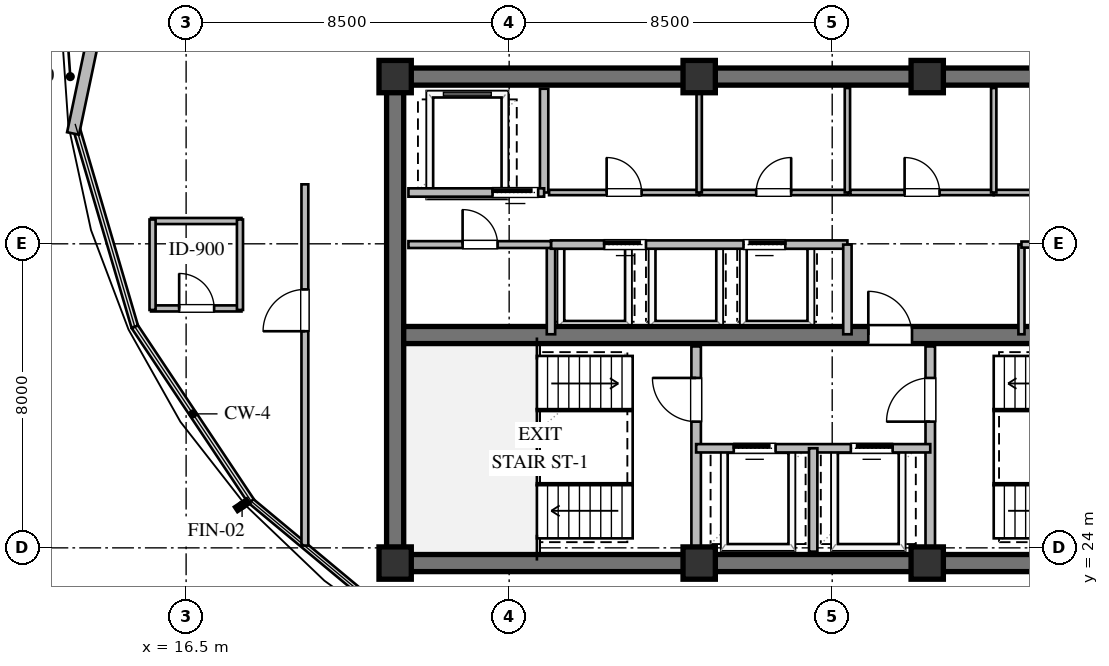
"""IFC4 building model, lengths in metres.
Left out: names, types, materials, properties, quantities, classifications, styles, units other than length and angle.
Written with IfcOpenShell. Run it as: python <this file> out.ifc"""

import sys

from ifc_helpers import new_model, si_unit, direction, frame, frame_2d, origin, origin_2d, place, context, subcontext, project, spatial, rectangle, extrude, element, fill, save


model = new_model("IFC4")
c1 = context("Model", 3, precision=1e-05, world=origin(), true_north=direction((0.0, 1.0)))
c2 = subcontext(c1, "Body", "Model", "MODEL_VIEW")
j1 = project(units=[si_unit("LENGTHUNIT", "METRE"), si_unit("PLANEANGLEUNIT", "RADIAN")], contexts=[c1])
p1 = place(None, origin())
s1 = spatial("IfcSite", under=j1, at=p1, CompositionType="ELEMENT")
p2 = place(p1, origin())
s2 = spatial("IfcBuilding", under=s1, at=p2, CompositionType="ELEMENT")
p3 = place(p2, frame((0.0, 0.0, 249.6)))
s3 = spatial("IfcBuildingStorey", under=s2, at=p3, CompositionType="ELEMENT", Elevation=249.6)
for number, where, z_axis, x_axis in (
    (1, (21.775, 23.6, 0.0), (0.0, 0.0, 1.0), (1.0, 0.0, 0.0)),
    (2, (21.775, 36.4, 0.0), (0.0, 0.0, 1.0), (1.0, 0.0, 0.0)),
):
    element("IfcWall", number, at=place(p3, frame(where, z_axis=z_axis, x_axis=x_axis)), inside=s3, PredefinedType="SHEAR", context=c2, shape_type="SweptSolid", body=[
        extrude(rectangle(XDim=22.45, YDim=0.45, at=frame_2d((11.225, 0.0))), origin(), (0.0, 0.0, 1.0), 3.28),
    ])
p4 = place(p3, frame((22.0, 23.825, 0.0), z_axis=(0.0, 0.0, 1.0), x_axis=(0.0, 1.0, 0.0)))
e3 = element("IfcWall", 3, at=p4, inside=s3, PredefinedType="SHEAR", context=c2, shape_type="SweptSolid", body=[
    extrude(rectangle(XDim=12.35, YDim=0.45, at=frame_2d((6.175, 0.0))), origin(), (0.0, 0.0, 1.0), 3.28),
])
p5 = place(p3, frame((22.225, 29.6, 0.0), z_axis=(0.0, 0.0, 1.0), x_axis=(1.0, 0.0, 0.0)))
e4 = element("IfcWall", 4, at=p5, inside=s3, PredefinedType="SHEAR", context=c2, shape_type="SweptSolid", body=[
    extrude(rectangle(XDim=21.55, YDim=0.45, at=frame_2d((10.775, 0.0))), origin(), (0.0, 0.0, 1.0), 3.28),
])
p6 = place(p5, frame((12.225, 0.0, 0.0)))
e5 = element("IfcOpeningElement", 5, at=p6, cuts=e4, PredefinedType="OPENING", context=c2, shape_type="SweptSolid", body=[
    extrude(rectangle(XDim=1.15, YDim=2.1, at=frame_2d((0.575, 1.05))), frame((0.0, 0.235, 0.0), z_axis=(0.0, -1.0, 0.0), x_axis=(1.0, 0.0, 0.0)), (0.0, 0.0, 1.0), 0.47),
])
for number, where, z_axis, x_axis in (
    (6, (22.0, 23.6, 0.0), (0.0, 0.0, 1.0), (1.0, 0.0, 0.0)),
    (7, (30.0, 23.6, 0.0), (0.0, 0.0, 1.0), (1.0, 0.0, 0.0)),
    (8, (36.0, 23.6, 0.0), (0.0, 0.0, 1.0), (1.0, 0.0, 0.0)),
    (9, (36.0, 36.4, 0.0), (0.0, 0.0, 1.0), (1.0, 0.0, 0.0)),
    (10, (30.0, 36.4, 0.0), (0.0, 0.0, 1.0), (1.0, 0.0, 0.0)),
    (11, (22.0, 36.4, 0.0), (0.0, 0.0, 1.0), (1.0, 0.0, 0.0)),
):
    element("IfcColumn", number, at=place(p3, frame(where, z_axis=z_axis, x_axis=x_axis)), inside=s3, PredefinedType="COLUMN", context=c2, shape_type="SweptSolid", body=[
        extrude(rectangle(XDim=0.85, YDim=0.85, at=origin_2d()), origin(), (0.0, 0.0, 1.0), 3.6),
    ])
p7 = place(p3, frame((13.525, 34.903, 0.0), z_axis=(0.0, 0.0, 1.0), x_axis=(0.206301080321, 0.978488561128, 0.0)))
e12 = element("IfcWall", 12, at=p7, inside=s3, PredefinedType="STANDARD", context=c2, shape_type="SweptSolid", body=[
    extrude(rectangle(XDim=14.819, YDim=0.32, at=frame_2d((7.409, 0.0))), origin(), (0.0, 0.0, 1.0), 2.726),
])
p8 = place(p3, frame((29.92, 23.9, 0.0), z_axis=(0.0, 0.0, 1.0), x_axis=(0.0, 1.0, 0.0)))
e13 = element("IfcWall", 13, at=p8, inside=s3, PredefinedType="SOLIDWALL", context=c2, shape_type="SweptSolid", body=[
    extrude(rectangle(XDim=5.4, YDim=0.25, at=frame_2d((2.7, 0.0))), origin(), (0.0, 0.0, 1.0), 3.28),
])
p9 = place(p8, frame((3.421, 0.0, 0.0)))
e14 = element("IfcOpeningElement", 14, at=p9, cuts=e13, PredefinedType="OPENING", context=c2, shape_type="SweptSolid", body=[
    extrude(rectangle(XDim=1.15, YDim=2.1, at=frame_2d((0.575, 1.05))), frame((0.0, 0.135, 0.0), z_axis=(0.0, -1.0, 0.0), x_axis=(1.0, 0.0, 0.0)), (0.0, 0.0, 1.0), 0.27),
])
p10 = place(p3, frame((36.08, 23.9, 0.0), z_axis=(0.0, 0.0, 1.0), x_axis=(0.0, 1.0, 0.0)))
e15 = element("IfcWall", 15, at=p10, inside=s3, PredefinedType="SOLIDWALL", context=c2, shape_type="SweptSolid", body=[
    extrude(rectangle(XDim=5.4, YDim=0.25, at=frame_2d((2.7, 0.0))), origin(), (0.0, 0.0, 1.0), 3.28),
])
p11 = place(p10, frame((3.421, 0.0, 0.0)))
e16 = element("IfcOpeningElement", 16, at=p11, cuts=e15, PredefinedType="OPENING", context=c2, shape_type="SweptSolid", body=[
    extrude(rectangle(XDim=1.15, YDim=2.1, at=frame_2d((0.575, 1.05))), frame((0.0, 0.135, 0.0), z_axis=(0.0, -1.0, 0.0), x_axis=(1.0, 0.0, 0.0)), (0.0, 0.0, 1.0), 0.27),
])
p12 = place(p3, frame((29.92, 26.62, 0.0), z_axis=(0.0, 0.0, 1.0), x_axis=(1.0, 0.0, 0.0)))
e17 = element("IfcWall", 17, at=p12, inside=s3, PredefinedType="SOLIDWALL", context=c2, shape_type="SweptSolid", body=[
    extrude(rectangle(XDim=6.16, YDim=0.22, at=frame_2d((3.08, 0.0))), origin(), (0.0, 0.0, 1.0), 3.28),
])
p13 = place(p12, frame((0.99, 0.0, 0.0)))
e18 = element("IfcOpeningElement", 18, at=p13, cuts=e17, PredefinedType="OPENING", context=c2, shape_type="SweptSolid", body=[
    extrude(rectangle(XDim=1.1, YDim=2.1, at=frame_2d((0.55, 1.05))), frame((0.0, 0.12, 0.0), z_axis=(0.0, -1.0, 0.0), x_axis=(1.0, 0.0, 0.0)), (0.0, 0.0, 1.0), 0.24),
])
p14 = place(p12, frame((4.07, 0.0, 0.0)))
e19 = element("IfcOpeningElement", 19, at=p14, cuts=e17, PredefinedType="OPENING", context=c2, shape_type="SweptSolid", body=[
    extrude(rectangle(XDim=1.1, YDim=2.1, at=frame_2d((0.55, 1.05))), frame((0.0, 0.12, 0.0), z_axis=(0.0, -1.0, 0.0), x_axis=(1.0, 0.0, 0.0)), (0.0, 0.0, 1.0), 0.24),
])
p15 = place(p3, frame((33.0, 23.9, 0.0), z_axis=(0.0, 0.0, 1.0), x_axis=(0.0, 1.0, 0.0)))
e20 = element("IfcWall", 20, at=p15, inside=s3, PredefinedType="SOLIDWALL", context=c2, shape_type="SweptSolid", body=[
    extrude(rectangle(XDim=2.72, YDim=0.22, at=frame_2d((1.36, 0.0))), origin(), (0.0, 0.0, 1.0), 3.28),
])
p16 = place(p3, frame((25.92, 33.35, 0.0), z_axis=(0.0, 0.0, 1.0), x_axis=(0.0, 1.0, 0.0)))
e21 = element("IfcWall", 21, at=p16, inside=s3, PredefinedType="SOLIDWALL", context=c2, shape_type="SweptSolid", body=[
    extrude(rectangle(XDim=2.73, YDim=0.22, at=frame_2d((1.365, 0.0))), origin(), (0.0, 0.0, 1.0), 3.28),
])
p17 = place(p3, frame((22.35, 33.35, 0.0), z_axis=(0.0, 0.0, 1.0), x_axis=(1.0, 0.0, 0.0)))
e22 = element("IfcWall", 22, at=p17, inside=s3, PredefinedType="SOLIDWALL", context=c2, shape_type="SweptSolid", body=[
    extrude(rectangle(XDim=3.57, YDim=0.22, at=frame_2d((1.785, 0.0))), origin(), (0.0, 0.0, 1.0), 3.28),
])
p18 = place(p17, frame((2.213, 0.0, 0.0)))
e23 = element("IfcOpeningElement", 23, at=p18, cuts=e22, PredefinedType="OPENING", context=c2, shape_type="SweptSolid", body=[
    extrude(rectangle(XDim=1.2, YDim=2.1, at=frame_2d((0.6, 1.05))), frame((0.0, 0.12, 0.0), z_axis=(0.0, -1.0, 0.0), x_axis=(1.0, 0.0, 0.0)), (0.0, 0.0, 1.0), 0.24),
])
p19 = place(p3, frame((26.1, 29.62, 0.0), z_axis=(0.0, 0.0, 1.0), x_axis=(0.0, 1.0, 0.0)))
e24 = element("IfcWall", 24, at=p19, inside=s3, PredefinedType="SOLIDWALL", context=c2, shape_type="SweptSolid", body=[
    extrude(rectangle(XDim=2.36, YDim=0.22, at=frame_2d((1.18, 0.0))), origin(), (0.0, 0.0, 1.0), 3.28),
])
p20 = place(p3, frame((26.1, 31.98, 0.0), z_axis=(0.0, 0.0, 1.0), x_axis=(1.0, 0.0, 0.0)))
e25 = element("IfcWall", 25, at=p20, inside=s3, PredefinedType="SOLIDWALL", context=c2, shape_type="SweptSolid", body=[
    extrude(rectangle(XDim=7.8, YDim=0.22, at=frame_2d((3.9, 0.0))), origin(), (0.0, 0.0, 1.0), 3.28),
])
p21 = place(p20, frame((1.4, 0.0, 0.0)))
e26 = element("IfcOpeningElement", 26, at=p21, cuts=e25, PredefinedType="OPENING", context=c2, shape_type="SweptSolid", body=[
    extrude(rectangle(XDim=1.1, YDim=2.1, at=frame_2d((0.55, 1.05))), frame((0.0, 0.12, 0.0), z_axis=(0.0, -1.0, 0.0), x_axis=(1.0, 0.0, 0.0)), (0.0, 0.0, 1.0), 0.24),
])
p22 = place(p20, frame((5.066, 0.0, 0.0)))
e27 = element("IfcOpeningElement", 27, at=p22, cuts=e25, PredefinedType="OPENING", context=c2, shape_type="SweptSolid", body=[
    extrude(rectangle(XDim=1.1, YDim=2.1, at=frame_2d((0.55, 1.05))), frame((0.0, 0.12, 0.0), z_axis=(0.0, -1.0, 0.0), x_axis=(1.0, 0.0, 0.0)), (0.0, 0.0, 1.0), 0.24),
])
p23 = place(p3, frame((33.9, 29.62, 0.0), z_axis=(0.0, 0.0, 1.0), x_axis=(0.0, 1.0, 0.0)))
e28 = element("IfcWall", 28, at=p23, inside=s3, PredefinedType="SOLIDWALL", context=c2, shape_type="SweptSolid", body=[
    extrude(rectangle(XDim=2.36, YDim=0.22, at=frame_2d((1.18, 0.0))), origin(), (0.0, 0.0, 1.0), 3.28),
])
p24 = place(p3, frame((26.05, 33.35, 0.0), z_axis=(0.0, 0.0, 1.0), x_axis=(1.0, 0.0, 0.0)))
e29 = element("IfcWall", 29, at=p24, inside=s3, PredefinedType="PARTITIONING", context=c2, shape_type="SweptSolid", body=[
    extrude(rectangle(XDim=3.95, YDim=0.14, at=frame_2d((1.975, 0.0))), origin(), (0.0, 0.0, 1.0), 3.28),
])
p25 = place(p24, frame((1.515, 0.0, 0.0)))
e30 = element("IfcOpeningElement", 30, at=p25, cuts=e29, PredefinedType="OPENING", context=c2, shape_type="SweptSolid", body=[
    extrude(rectangle(XDim=0.92, YDim=2.1, at=frame_2d((0.46, 1.05))), frame((0.0, 0.08, 0.0), z_axis=(0.0, -1.0, 0.0), x_axis=(1.0, 0.0, 0.0)), (0.0, 0.0, 1.0), 0.16),
])
p26 = place(p3, frame((30.0, 33.35, 0.0), z_axis=(0.0, 0.0, 1.0), x_axis=(1.0, 0.0, 0.0)))
e31 = element("IfcWall", 31, at=p26, inside=s3, PredefinedType="PARTITIONING", context=c2, shape_type="SweptSolid", body=[
    extrude(rectangle(XDim=3.92, YDim=0.14, at=frame_2d((1.96, 0.0))), origin(), (0.0, 0.0, 1.0), 3.28),
])
p27 = place(p26, frame((1.5, 0.0, 0.0)))
e32 = element("IfcOpeningElement", 32, at=p27, cuts=e31, PredefinedType="OPENING", context=c2, shape_type="SweptSolid", body=[
    extrude(rectangle(XDim=0.92, YDim=2.1, at=frame_2d((0.46, 1.05))), frame((0.0, 0.08, 0.0), z_axis=(0.0, -1.0, 0.0), x_axis=(1.0, 0.0, 0.0)), (0.0, 0.0, 1.0), 0.16),
])
for number, where, z_axis, x_axis in (
    (33, (30.0, 33.35, 0.0), (0.0, 0.0, 1.0), (0.0, 1.0, 0.0)),
    (34, (33.9, 33.35, 0.0), (0.0, 0.0, 1.0), (0.0, 1.0, 0.0)),
):
    element("IfcWall", number, at=place(p3, frame(where, z_axis=z_axis, x_axis=x_axis)), inside=s3, PredefinedType="PARTITIONING", context=c2, shape_type="SweptSolid", body=[
        extrude(rectangle(XDim=2.75, YDim=0.14, at=frame_2d((1.375, 0.0))), origin(), (0.0, 0.0, 1.0), 3.28),
    ])
p28 = place(p3, frame((33.98, 33.35, 0.0), z_axis=(0.0, 0.0, 1.0), x_axis=(1.0, 0.0, 0.0)))
e35 = element("IfcWall", 35, at=p28, inside=s3, PredefinedType="PARTITIONING", context=c2, shape_type="SweptSolid", body=[
    extrude(rectangle(XDim=3.77, YDim=0.14, at=frame_2d((1.885, 0.0))), origin(), (0.0, 0.0, 1.0), 3.28),
])
p29 = place(p28, frame((1.425, 0.0, 0.0)))
e36 = element("IfcOpeningElement", 36, at=p29, cuts=e35, PredefinedType="OPENING", context=c2, shape_type="SweptSolid", body=[
    extrude(rectangle(XDim=0.92, YDim=2.1, at=frame_2d((0.46, 1.05))), frame((0.0, 0.08, 0.0), z_axis=(0.0, -1.0, 0.0), x_axis=(1.0, 0.0, 0.0)), (0.0, 0.0, 1.0), 0.16),
])
p30 = place(p3, frame((37.75, 33.35, 0.0), z_axis=(0.0, 0.0, 1.0), x_axis=(1.0, 0.0, 0.0)))
e37 = element("IfcWall", 37, at=p30, inside=s3, PredefinedType="PARTITIONING", context=c2, shape_type="SweptSolid", body=[
    extrude(rectangle(XDim=3.77, YDim=0.14, at=frame_2d((1.885, 0.0))), origin(), (0.0, 0.0, 1.0), 3.28),
])
p31 = place(p30, frame((1.425, 0.0, 0.0)))
e38 = element("IfcOpeningElement", 38, at=p31, cuts=e37, PredefinedType="OPENING", context=c2, shape_type="SweptSolid", body=[
    extrude(rectangle(XDim=0.92, YDim=2.1, at=frame_2d((0.46, 1.05))), frame((0.0, 0.08, 0.0), z_axis=(0.0, -1.0, 0.0), x_axis=(1.0, 0.0, 0.0)), (0.0, 0.0, 1.0), 0.16),
])
p32 = place(p3, frame((37.75, 33.35, 0.0), z_axis=(0.0, 0.0, 1.0), x_axis=(0.0, 1.0, 0.0)))
e39 = element("IfcWall", 39, at=p32, inside=s3, PredefinedType="PARTITIONING", context=c2, shape_type="SweptSolid", body=[
    extrude(rectangle(XDim=2.75, YDim=0.14, at=frame_2d((1.375, 0.0))), origin(), (0.0, 0.0, 1.0), 3.28),
])
p33 = place(p3, frame((22.35, 31.98, 0.0), z_axis=(0.0, 0.0, 1.0), x_axis=(1.0, 0.0, 0.0)))
e40 = element("IfcWall", 40, at=p33, inside=s3, PredefinedType="PARTITIONING", context=c2, shape_type="SweptSolid", body=[
    extrude(rectangle(XDim=3.75, YDim=0.18, at=frame_2d((1.875, 0.0))), origin(), (0.0, 0.0, 1.0), 3.28),
])
p34 = place(p33, frame((1.425, 0.0, 0.0)))
e41 = element("IfcOpeningElement", 41, at=p34, cuts=e40, PredefinedType="OPENING", context=c2, shape_type="SweptSolid", body=[
    extrude(rectangle(XDim=0.92, YDim=2.1, at=frame_2d((0.46, 1.05))), frame((0.0, 0.1, 0.0), z_axis=(0.0, -1.0, 0.0), x_axis=(1.0, 0.0, 0.0)), (0.0, 0.0, 1.0), 0.2),
])
p35 = place(p3, frame((38.48, 29.62, 0.0), z_axis=(0.0, 0.0, 1.0), x_axis=(0.0, 1.0, 0.0)))
e42 = element("IfcWall", 42, at=p35, inside=s3, PredefinedType="PLUMBINGWALL", context=c2, shape_type="SweptSolid", body=[
    extrude(rectangle(XDim=2.36, YDim=0.16, at=frame_2d((1.18, 0.0))), origin(), (0.0, 0.0, 1.0), 3.28),
])
p36 = place(p3, frame((38.48, 31.98, 0.0), z_axis=(0.0, 0.0, 1.0), x_axis=(1.0, 0.0, 0.0)))
e43 = element("IfcWall", 43, at=p36, inside=s3, PredefinedType="PLUMBINGWALL", context=c2, shape_type="SweptSolid", body=[
    extrude(rectangle(XDim=1.52, YDim=0.16, at=frame_2d((0.76, 0.0))), origin(), (0.0, 0.0, 1.0), 3.28),
])
p37 = place(p36, frame((0.32, 0.0, 0.0)))
e44 = element("IfcOpeningElement", 44, at=p37, cuts=e43, PredefinedType="OPENING", context=c2, shape_type="SweptSolid", body=[
    extrude(rectangle(XDim=0.92, YDim=2.1, at=frame_2d((0.46, 1.05))), frame((0.0, 0.09, 0.0), z_axis=(0.0, -1.0, 0.0), x_axis=(1.0, 0.0, 0.0)), (0.0, 0.0, 1.0), 0.18),
])
p38 = place(p3, frame((15.577, 30.3, 0.0), z_axis=(0.0, 0.0, 1.0), x_axis=(1.0, 0.0, 0.0)))
e45 = element("IfcWall", 45, at=p38, inside=s3, PredefinedType="PLUMBINGWALL", context=c2, shape_type="SweptSolid", body=[
    extrude(rectangle(XDim=2.38, YDim=0.16, at=frame_2d((1.19, 0.0))), origin(), (0.0, 0.0, 1.0), 3.28),
])
p39 = place(p38, frame((0.74, 0.0, 0.0)))
e46 = element("IfcOpeningElement", 46, at=p39, cuts=e45, PredefinedType="OPENING", context=c2, shape_type="SweptSolid", body=[
    extrude(rectangle(XDim=0.92, YDim=2.1, at=frame_2d((0.46, 1.05))), frame((0.0, 0.09, 0.0), z_axis=(0.0, -1.0, 0.0), x_axis=(1.0, 0.0, 0.0)), (0.0, 0.0, 1.0), 0.18),
])
p40 = place(p3, frame((15.577, 32.6, 0.0), z_axis=(0.0, 0.0, 1.0), x_axis=(1.0, 0.0, 0.0)))
e47 = element("IfcWall", 47, at=p40, inside=s3, PredefinedType="PLUMBINGWALL", context=c2, shape_type="SweptSolid", body=[
    extrude(rectangle(XDim=2.38, YDim=0.16, at=frame_2d((1.19, 0.0))), origin(), (0.0, 0.0, 1.0), 3.28),
])
p41 = place(p3, frame((15.617, 30.26, 0.0), z_axis=(0.0, 0.0, 1.0), x_axis=(0.0, 1.0, 0.0)))
e48 = element("IfcWall", 48, at=p41, inside=s3, PredefinedType="PLUMBINGWALL", context=c2, shape_type="SweptSolid", body=[
    extrude(rectangle(XDim=2.38, YDim=0.16, at=frame_2d((1.19, 0.0))), origin(), (0.0, 0.0, 1.0), 3.28),
])
p42 = place(p3, frame((17.917, 30.26, 0.0), z_axis=(0.0, 0.0, 1.0), x_axis=(0.0, 1.0, 0.0)))
e49 = element("IfcWall", 49, at=p42, inside=s3, PredefinedType="PLUMBINGWALL", context=c2, shape_type="SweptSolid", body=[
    extrude(rectangle(XDim=2.38, YDim=0.16, at=frame_2d((1.19, 0.0))), origin(), (0.0, 0.0, 1.0), 2.737),
])
p43 = place(p3, frame((19.625, 24.06, 0.0), z_axis=(0.0, 0.0, 1.0), x_axis=(0.0, 1.0, 0.0)))
e50 = element("IfcWall", 50, at=p43, inside=s3, PredefinedType="PARTITIONING", context=c2, shape_type="SweptSolid", body=[
    extrude(rectangle(XDim=9.505, YDim=0.18, at=frame_2d((4.752, 0.0))), origin(), (0.0, 0.0, 1.0), 2.737),
])
p44 = place(p43, frame((5.64, 0.0, 0.0)))
e51 = element("IfcOpeningElement", 51, at=p44, cuts=e50, PredefinedType="OPENING", context=c2, shape_type="SweptSolid", body=[
    extrude(rectangle(XDim=1.1, YDim=2.1, at=frame_2d((0.55, 1.05))), frame((0.0, 0.1, 0.0), z_axis=(0.0, -1.0, 0.0), x_axis=(1.0, 0.0, 0.0)), (0.0, 0.0, 1.0), 0.2),
])
p45 = place(p9, origin())
e52 = element("IfcDoor", 52, at=p45, inside=s3, OperationType="SINGLE_SWING_RIGHT", PredefinedType="DOOR", context=c2, shape_type="SweptSolid", body=[
    extrude(rectangle(XDim=1.15, YDim=2.1, at=frame_2d((0.575, 1.05))), frame((0.0, 0.025, 0.0), z_axis=(0.0, -1.0, 0.0), x_axis=(1.0, 0.0, 0.0)), (0.0, 0.0, 1.0), 0.05),
])
fill(e14, e52)
p46 = place(p11, origin())
e53 = element("IfcDoor", 53, at=p46, inside=s3, OperationType="SINGLE_SWING_LEFT", PredefinedType="DOOR", context=c2, shape_type="SweptSolid", body=[
    extrude(rectangle(XDim=1.15, YDim=2.1, at=frame_2d((0.575, 1.05))), frame((0.0, 0.025, 0.0), z_axis=(0.0, -1.0, 0.0), x_axis=(1.0, 0.0, 0.0)), (0.0, 0.0, 1.0), 0.05),
])
fill(e16, e53)
p47 = place(p13, origin())
e54 = element("IfcDoor", 54, at=p47, inside=s3, OperationType="SLIDING_TO_LEFT", PredefinedType="DOOR", context=c2, shape_type="SweptSolid", body=[
    extrude(rectangle(XDim=1.1, YDim=2.1, at=frame_2d((0.55, 1.05))), frame((0.0, 0.025, 0.0), z_axis=(0.0, -1.0, 0.0), x_axis=(1.0, 0.0, 0.0)), (0.0, 0.0, 1.0), 0.05),
])
fill(e18, e54)
p48 = place(p14, origin())
e55 = element("IfcDoor", 55, at=p48, inside=s3, OperationType="SLIDING_TO_RIGHT", PredefinedType="DOOR", context=c2, shape_type="SweptSolid", body=[
    extrude(rectangle(XDim=1.1, YDim=2.1, at=frame_2d((0.55, 1.05))), frame((0.0, 0.025, 0.0), z_axis=(0.0, -1.0, 0.0), x_axis=(1.0, 0.0, 0.0)), (0.0, 0.0, 1.0), 0.05),
])
fill(e19, e55)
p49 = place(p6, origin())
e56 = element("IfcDoor", 56, at=p49, inside=s3, OperationType="SINGLE_SWING_LEFT", PredefinedType="DOOR", context=c2, shape_type="SweptSolid", body=[
    extrude(rectangle(XDim=1.15, YDim=2.1, at=frame_2d((0.575, 1.05))), frame((0.0, 0.025, 0.0), z_axis=(0.0, -1.0, 0.0), x_axis=(1.0, 0.0, 0.0)), (0.0, 0.0, 1.0), 0.05),
])
fill(e5, e56)
p50 = place(p18, origin())
e57 = element("IfcDoor", 57, at=p50, inside=s3, OperationType="SLIDING_TO_LEFT", PredefinedType="DOOR", context=c2, shape_type="SweptSolid", body=[
    extrude(rectangle(XDim=1.2, YDim=2.1, at=frame_2d((0.6, 1.05))), frame((0.0, 0.025, 0.0), z_axis=(0.0, -1.0, 0.0), x_axis=(1.0, 0.0, 0.0)), (0.0, 0.0, 1.0), 0.05),
])
fill(e23, e57)
p51 = place(p21, origin())
e58 = element("IfcDoor", 58, at=p51, inside=s3, OperationType="SLIDING_TO_LEFT", PredefinedType="DOOR", context=c2, shape_type="SweptSolid", body=[
    extrude(rectangle(XDim=1.1, YDim=2.1, at=frame_2d((0.55, 1.05))), frame((0.0, 0.025, 0.0), z_axis=(0.0, -1.0, 0.0), x_axis=(1.0, 0.0, 0.0)), (0.0, 0.0, 1.0), 0.05),
])
fill(e26, e58)
p52 = place(p22, origin())
e59 = element("IfcDoor", 59, at=p52, inside=s3, OperationType="SLIDING_TO_RIGHT", PredefinedType="DOOR", context=c2, shape_type="SweptSolid", body=[
    extrude(rectangle(XDim=1.1, YDim=2.1, at=frame_2d((0.55, 1.05))), frame((0.0, 0.025, 0.0), z_axis=(0.0, -1.0, 0.0), x_axis=(1.0, 0.0, 0.0)), (0.0, 0.0, 1.0), 0.05),
])
fill(e27, e59)
p53 = place(p25, origin())
e60 = element("IfcDoor", 60, at=p53, inside=s3, OperationType="SINGLE_SWING_LEFT", PredefinedType="DOOR", context=c2, shape_type="SweptSolid", body=[
    extrude(rectangle(XDim=0.92, YDim=2.1, at=frame_2d((0.46, 1.05))), frame((0.0, 0.025, 0.0), z_axis=(0.0, -1.0, 0.0), x_axis=(1.0, 0.0, 0.0)), (0.0, 0.0, 1.0), 0.05),
])
fill(e30, e60)
p54 = place(p27, origin())
e61 = element("IfcDoor", 61, at=p54, inside=s3, OperationType="SINGLE_SWING_RIGHT", PredefinedType="DOOR", context=c2, shape_type="SweptSolid", body=[
    extrude(rectangle(XDim=0.92, YDim=2.1, at=frame_2d((0.46, 1.05))), frame((0.0, 0.025, 0.0), z_axis=(0.0, -1.0, 0.0), x_axis=(1.0, 0.0, 0.0)), (0.0, 0.0, 1.0), 0.05),
])
fill(e32, e61)
p55 = place(p29, origin())
e62 = element("IfcDoor", 62, at=p55, inside=s3, OperationType="SINGLE_SWING_LEFT", PredefinedType="DOOR", context=c2, shape_type="SweptSolid", body=[
    extrude(rectangle(XDim=0.92, YDim=2.1, at=frame_2d((0.46, 1.05))), frame((0.0, 0.025, 0.0), z_axis=(0.0, -1.0, 0.0), x_axis=(1.0, 0.0, 0.0)), (0.0, 0.0, 1.0), 0.05),
])
fill(e36, e62)
p56 = place(p34, origin())
e63 = element("IfcDoor", 63, at=p56, inside=s3, OperationType="SINGLE_SWING_LEFT", PredefinedType="DOOR", context=c2, shape_type="SweptSolid", body=[
    extrude(rectangle(XDim=0.92, YDim=2.1, at=frame_2d((0.46, 1.05))), frame((0.0, 0.025, 0.0), z_axis=(0.0, -1.0, 0.0), x_axis=(1.0, 0.0, 0.0)), (0.0, 0.0, 1.0), 0.05),
])
fill(e41, e63)
p57 = place(p39, origin())
e64 = element("IfcDoor", 64, at=p57, inside=s3, OperationType="SINGLE_SWING_LEFT", PredefinedType="DOOR", context=c2, shape_type="SweptSolid", body=[
    extrude(rectangle(XDim=0.92, YDim=2.1, at=frame_2d((0.46, 1.05))), frame((0.0, 0.025, 0.0), z_axis=(0.0, -1.0, 0.0), x_axis=(1.0, 0.0, 0.0)), (0.0, 0.0, 1.0), 0.05),
])
fill(e46, e64)
p58 = place(p44, origin())
e65 = element("IfcDoor", 65, at=p58, inside=s3, OperationType="SINGLE_SWING_LEFT", PredefinedType="DOOR", context=c2, shape_type="SweptSolid", body=[
    extrude(rectangle(XDim=1.1, YDim=2.1, at=frame_2d((0.55, 1.05))), frame((0.0, 0.025, 0.0), z_axis=(0.0, -1.0, 0.0), x_axis=(1.0, 0.0, 0.0)), (0.0, 0.0, 1.0), 0.05),
])
fill(e51, e65)
save(model, sys.argv[1])
